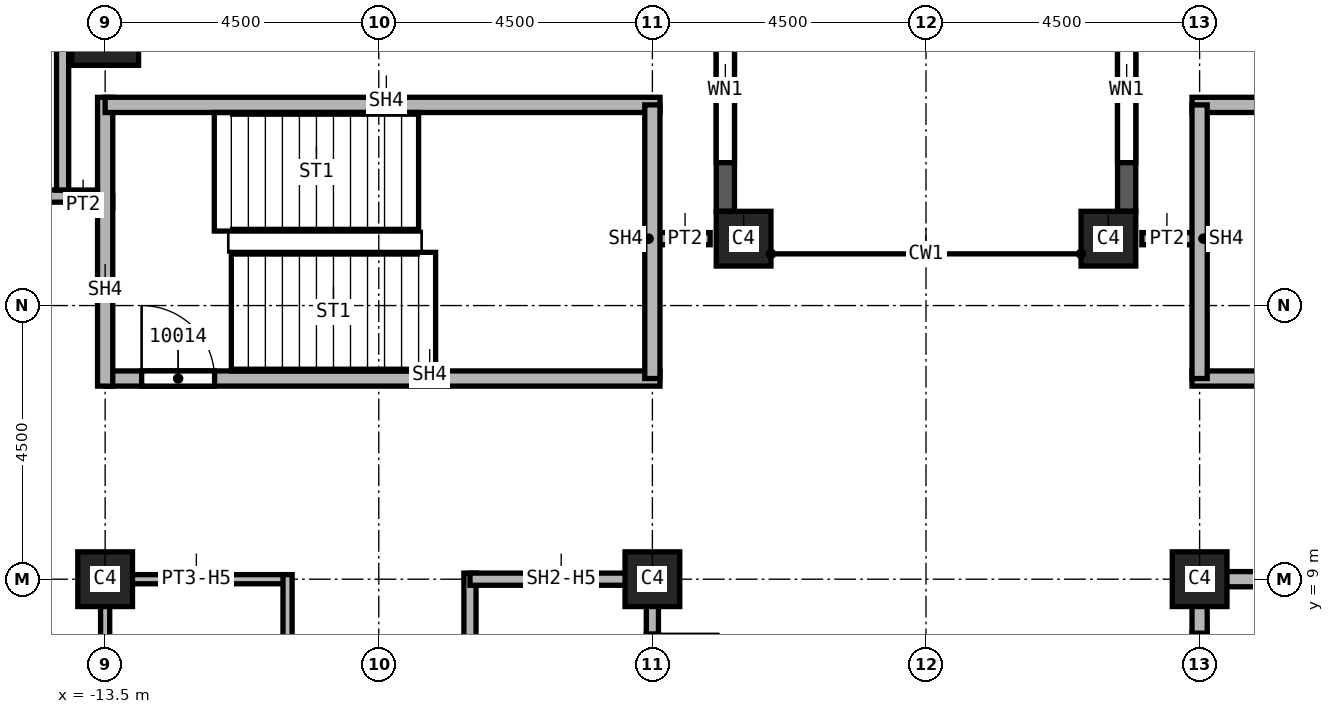
"""IFC4 building model, lengths in metres.
Left out: names, types, materials, properties, quantities, classifications, styles, units other than length and angle.
Written with IfcOpenShell. Run it as: python <this file> out.ifc"""

import sys

from ifc_helpers import new_model, si_unit, direction, frame, frame_2d, origin, origin_2d, place, context, subcontext, project, spatial, rectangle, extrude, element, fill, save


model = new_model("IFC4")
c1 = context("Model", 3, precision=1e-05, world=origin(), true_north=direction((0.0, 1.0)))
c2 = subcontext(c1, "Body", "Model", "MODEL_VIEW")
j1 = project(units=[si_unit("LENGTHUNIT", "METRE"), si_unit("PLANEANGLEUNIT", "RADIAN")], contexts=[c1])
p1 = place(None, origin())
s1 = spatial("IfcSite", under=j1, at=p1, CompositionType="ELEMENT")
p2 = place(p1, origin())
s2 = spatial("IfcBuilding", under=s1, at=p2, CompositionType="ELEMENT")
p3 = place(p2, frame((0.0, 0.0, 174.0)))
s3 = spatial("IfcBuildingStorey", under=s2, at=p3, CompositionType="ELEMENT", Elevation=174.0)
p4 = place(p3, frame((-13.5, 18.0, 0.0), z_axis=(0.0, 0.0, 1.0), x_axis=(1.0, 0.0, 0.0)))
e1 = element("IfcColumn", 1, at=p4, inside=s3, PredefinedType="COLUMN", context=c2, shape_type="SweptSolid", body=[
    extrude(rectangle(XDim=1.1, YDim=1.1, at=origin_2d()), origin(), (0.0, 0.0, 1.0), 3.59),
])
for number, where, z_axis, x_axis in (
    (2, (4.5, 9.0, 0.0), (0.0, 0.0, 1.0), (1.0, 0.0, 0.0)),
    (3, (-4.5, 9.0, 0.0), (0.0, 0.0, 1.0), (1.0, 0.0, 0.0)),
    (4, (-13.5, 9.0, 0.0), (0.0, 0.0, 1.0), (1.0, 0.0, 0.0)),
    (5, (3.0, 14.6, 0.0), (0.0, 0.0, 1.0), (1.0, 0.0, 0.0)),
    (6, (-3.0, 14.6, 0.0), (0.0, 0.0, 1.0), (1.0, 0.0, 0.0)),
):
    element("IfcColumn", number, at=place(p3, frame(where, z_axis=z_axis, x_axis=x_axis)), inside=s3, PredefinedType="COLUMN", context=c2, shape_type="SweptSolid", body=[
        extrude(rectangle(XDim=0.9, YDim=0.9, at=origin_2d()), origin(), (0.0, 0.0, 1.0), 3.59),
    ])
p5 = place(p3, frame((3.3, 23.05, 0.0), z_axis=(0.0, 0.0, 1.0), x_axis=(0.0, -1.0, 0.0)))
e7 = element("IfcWall", 7, at=p5, inside=s3, PredefinedType="SOLIDWALL", context=c2, shape_type="SweptSolid", body=[
    extrude(rectangle(XDim=8.0, YDim=0.3, at=frame_2d((4.0, 0.0))), origin(), (0.0, 0.0, 1.0), 2.99),
])
p6 = place(p5, frame((0.8, 0.0, 0.8)))
e8 = element("IfcOpeningElement", 8, at=p6, cuts=e7, PredefinedType="OPENING", context=c2, shape_type="SweptSolid", body=[
    extrude(rectangle(XDim=2.4, YDim=1.95, at=frame_2d((1.2, 0.975))), frame((0.0, 0.15, 0.0), z_axis=(0.0, -1.0, 0.0), x_axis=(1.0, 0.0, 0.0)), (0.0, 0.0, 1.0), 0.3),
])
p7 = place(p5, frame((4.8, 0.0, 0.8)))
e9 = element("IfcOpeningElement", 9, at=p7, cuts=e7, PredefinedType="OPENING", context=c2, shape_type="SweptSolid", body=[
    extrude(rectangle(XDim=2.4, YDim=1.95, at=frame_2d((1.2, 0.975))), frame((0.0, 0.15, 0.0), z_axis=(0.0, -1.0, 0.0), x_axis=(1.0, 0.0, 0.0)), (0.0, 0.0, 1.0), 0.3),
])
p8 = place(p3, frame((-3.3, 15.05, 0.0), z_axis=(0.0, 0.0, 1.0), x_axis=(0.0, 1.0, 0.0)))
e10 = element("IfcWall", 10, at=p8, inside=s3, PredefinedType="SOLIDWALL", context=c2, shape_type="SweptSolid", body=[
    extrude(rectangle(XDim=8.0, YDim=0.3, at=frame_2d((4.0, 0.0))), origin(), (0.0, 0.0, 1.0), 2.99),
])
p9 = place(p8, frame((0.8, 0.0, 0.8)))
e11 = element("IfcOpeningElement", 11, at=p9, cuts=e10, PredefinedType="OPENING", context=c2, shape_type="SweptSolid", body=[
    extrude(rectangle(XDim=2.4, YDim=1.95, at=frame_2d((1.2, 0.975))), frame((0.0, 0.15, 0.0), z_axis=(0.0, -1.0, 0.0), x_axis=(1.0, 0.0, 0.0)), (0.0, 0.0, 1.0), 0.3),
])
p10 = place(p8, frame((4.8, 0.0, 0.8)))
e12 = element("IfcOpeningElement", 12, at=p10, cuts=e10, PredefinedType="OPENING", context=c2, shape_type="SweptSolid", body=[
    extrude(rectangle(XDim=2.4, YDim=1.95, at=frame_2d((1.2, 0.975))), frame((0.0, 0.15, 0.0), z_axis=(0.0, -1.0, 0.0), x_axis=(1.0, 0.0, 0.0)), (0.0, 0.0, 1.0), 0.3),
])
p11 = place(p3, frame((-14.1, 15.2, 0.0), z_axis=(0.0, 0.0, 1.0), x_axis=(1.0, 0.0, 0.0)))
e13 = element("IfcWall", 13, at=p11, inside=s3, PredefinedType="PARTITIONING", context=c2, shape_type="SweptSolid", body=[
    extrude(rectangle(XDim=0.725, YDim=0.2, at=frame_2d((0.363, 0.0))), origin(), (0.0, 0.0, 1.0), 3.59),
])
for number, where, z_axis, x_axis in (
    (14, (-4.5, 14.6, 0.0), (0.0, 0.0, 1.0), (1.0, 0.0, 0.0)),
    (15, (3.55, 14.6, 0.0), (0.0, 0.0, 1.0), (1.0, 0.0, 0.0)),
):
    element("IfcWall", number, at=place(p3, frame(where, z_axis=z_axis, x_axis=x_axis)), inside=s3, PredefinedType="PARTITIONING", context=c2, shape_type="SweptSolid", body=[
        extrude(rectangle(XDim=0.95, YDim=0.2, at=frame_2d((0.475, 0.0))), origin(), (0.0, 0.0, 1.0), 3.59),
    ])
p12 = place(p3, frame((-7.5, 2.875, 0.0), z_axis=(0.0, 0.0, 1.0), x_axis=(0.0, 1.0, 0.0)))
e16 = element("IfcWall", 16, at=p12, inside=s3, PredefinedType="SOLIDWALL", context=c2, shape_type="SweptSolid", body=[
    extrude(rectangle(XDim=6.225, YDim=0.2, at=frame_2d((3.113, 0.0))), origin(), (0.0, 0.0, 1.0), 3.59),
])
p13 = place(p3, frame((-7.5, 9.0, 0.0), z_axis=(0.0, 0.0, 1.0), x_axis=(1.0, 0.0, 0.0)))
e17 = element("IfcWall", 17, at=p13, inside=s3, PredefinedType="SOLIDWALL", context=c2, shape_type="SweptSolid", body=[
    extrude(rectangle(XDim=3.0, YDim=0.2, at=frame_2d((1.5, 0.0))), origin(), (0.0, 0.0, 1.0), 2.828),
])
p14 = place(p3, frame((-4.5, 9.1, 0.0), z_axis=(0.0, 0.0, 1.0), x_axis=(0.0, -1.0, 0.0)))
e18 = element("IfcWall", 18, at=p14, inside=s3, PredefinedType="SOLIDWALL", context=c2, shape_type="SweptSolid", body=[
    extrude(rectangle(XDim=9.1, YDim=0.2, at=frame_2d((4.55, 0.0))), origin(), (0.0, 0.0, 1.0), 2.828),
])
p15 = place(p14, frame((6.5, 0.0, 0.0)))
e19 = element("IfcOpeningElement", 19, at=p15, cuts=e18, PredefinedType="OPENING", context=c2, shape_type="SweptSolid", body=[
    extrude(rectangle(XDim=1.1, YDim=2.1, at=frame_2d((0.55, 1.05))), frame((0.0, 0.1, 0.0), z_axis=(0.0, -1.0, 0.0), x_axis=(1.0, 0.0, 0.0)), (0.0, 0.0, 1.0), 0.2),
])
p16 = place(p14, frame((1.0, 0.0, 0.0)))
e20 = element("IfcOpeningElement", 20, at=p16, cuts=e18, PredefinedType="OPENING", context=c2, shape_type="SweptSolid", body=[
    extrude(rectangle(XDim=1.1, YDim=2.1, at=frame_2d((0.55, 1.05))), frame((0.0, 0.1, 0.0), z_axis=(0.0, -1.0, 0.0), x_axis=(1.0, 0.0, 0.0)), (0.0, 0.0, 1.0), 0.2),
])
p17 = place(p3, frame((4.5, 0.0, 0.0), z_axis=(0.0, 0.0, 1.0), x_axis=(0.0, 1.0, 0.0)))
e21 = element("IfcWall", 21, at=p17, inside=s3, PredefinedType="SOLIDWALL", context=c2, shape_type="SweptSolid", body=[
    extrude(rectangle(XDim=9.125, YDim=0.25, at=frame_2d((4.562, 0.0))), origin(), (0.0, 0.0, 1.0), 2.828),
])
p18 = place(p17, frame((0.95, 0.0, 0.0)))
e22 = element("IfcOpeningElement", 22, at=p18, cuts=e21, PredefinedType="OPENING", context=c2, shape_type="SweptSolid", body=[
    extrude(rectangle(XDim=1.1, YDim=2.1, at=frame_2d((0.55, 1.05))), frame((0.0, 0.125, 0.0), z_axis=(0.0, -1.0, 0.0), x_axis=(1.0, 0.0, 0.0)), (0.0, 0.0, 1.0), 0.25),
])
p19 = place(p17, frame((3.95, 0.0, 0.0)))
e23 = element("IfcOpeningElement", 23, at=p19, cuts=e21, PredefinedType="OPENING", context=c2, shape_type="SweptSolid", body=[
    extrude(rectangle(XDim=1.1, YDim=2.1, at=frame_2d((0.55, 1.05))), frame((0.0, 0.125, 0.0), z_axis=(0.0, -1.0, 0.0), x_axis=(1.0, 0.0, 0.0)), (0.0, 0.0, 1.0), 0.25),
])
p20 = place(p17, frame((7.012, 0.0, 0.0)))
e24 = element("IfcOpeningElement", 24, at=p20, cuts=e21, PredefinedType="OPENING", context=c2, shape_type="SweptSolid", body=[
    extrude(rectangle(XDim=1.1, YDim=2.1, at=frame_2d((0.55, 1.05))), frame((0.0, 0.125, 0.0), z_axis=(0.0, -1.0, 0.0), x_axis=(1.0, 0.0, 0.0)), (0.0, 0.0, 1.0), 0.25),
])
p21 = place(p3, frame((4.5, 9.0, 0.0), z_axis=(0.0, 0.0, 1.0), x_axis=(1.0, 0.0, 0.0)))
e25 = element("IfcWall", 25, at=p21, inside=s3, PredefinedType="SOLIDWALL", context=c2, shape_type="SweptSolid", body=[
    extrude(rectangle(XDim=3.0, YDim=0.25, at=frame_2d((1.5, 0.0))), origin(), (0.0, 0.0, 1.0), 2.828),
])
p22 = place(p3, frame((-13.5, 12.3, 0.0), z_axis=(0.0, 0.0, 1.0), x_axis=(1.0, 0.0, 0.0)))
e26 = element("IfcWall", 26, at=p22, inside=s3, PredefinedType="SOLIDWALL", context=c2, shape_type="SweptSolid", body=[
    extrude(rectangle(XDim=9.125, YDim=0.25, at=frame_2d((4.562, 0.0))), origin(), (0.0, 0.0, 1.0), 3.59),
])
p23 = place(p22, frame((0.6, 0.0, 0.0)))
e27 = element("IfcOpeningElement", 27, at=p23, cuts=e26, PredefinedType="OPENING", context=c2, shape_type="SweptSolid", body=[
    extrude(rectangle(XDim=1.2, YDim=2.1, at=frame_2d((0.6, 1.05))), frame((0.0, 0.125, 0.0), z_axis=(0.0, -1.0, 0.0), x_axis=(1.0, 0.0, 0.0)), (0.0, 0.0, 1.0), 0.25),
])
p24 = place(p3, frame((-13.5, 12.175, 0.0), z_axis=(0.0, 0.0, 1.0), x_axis=(0.0, 1.0, 0.0)))
e28 = element("IfcWall", 28, at=p24, inside=s3, PredefinedType="SOLIDWALL", context=c2, shape_type="SweptSolid", body=[
    extrude(rectangle(XDim=4.75, YDim=0.25, at=frame_2d((2.375, 0.0))), origin(), (0.0, 0.0, 1.0), 3.59),
])
p25 = place(p3, frame((-13.5, 16.8, 0.0), z_axis=(0.0, 0.0, 1.0), x_axis=(1.0, 0.0, 0.0)))
e29 = element("IfcWall", 29, at=p25, inside=s3, PredefinedType="SOLIDWALL", context=c2, shape_type="SweptSolid", body=[
    extrude(rectangle(XDim=9.125, YDim=0.25, at=frame_2d((4.562, 0.0))), origin(), (0.0, 0.0, 1.0), 3.59),
])
p26 = place(p3, frame((-4.5, 16.8, 0.0), z_axis=(0.0, 0.0, 1.0), x_axis=(0.0, -1.0, 0.0)))
e30 = element("IfcWall", 30, at=p26, inside=s3, PredefinedType="SOLIDWALL", context=c2, shape_type="SweptSolid", body=[
    extrude(rectangle(XDim=4.5, YDim=0.25, at=frame_2d((2.25, 0.0))), origin(), (0.0, 0.0, 1.0), 3.59),
])
p27 = place(p3, frame((4.375, 12.3, 0.0), z_axis=(0.0, 0.0, 1.0), x_axis=(1.0, 0.0, 0.0)))
e31 = element("IfcWall", 31, at=p27, inside=s3, PredefinedType="SOLIDWALL", context=c2, shape_type="SweptSolid", body=[
    extrude(rectangle(XDim=9.125, YDim=0.25, at=frame_2d((4.562, 0.0))), origin(), (0.0, 0.0, 1.0), 3.59),
])
p28 = place(p27, frame((7.2, 0.0, 0.0)))
e32 = element("IfcOpeningElement", 32, at=p28, cuts=e31, PredefinedType="OPENING", context=c2, shape_type="SweptSolid", body=[
    extrude(rectangle(XDim=1.2, YDim=2.1, at=frame_2d((0.6, 1.05))), frame((0.0, 0.125, 0.0), z_axis=(0.0, -1.0, 0.0), x_axis=(1.0, 0.0, 0.0)), (0.0, 0.0, 1.0), 0.25),
])
p29 = place(p3, frame((4.375, 16.8, 0.0), z_axis=(0.0, 0.0, 1.0), x_axis=(1.0, 0.0, 0.0)))
e33 = element("IfcWall", 33, at=p29, inside=s3, PredefinedType="SOLIDWALL", context=c2, shape_type="SweptSolid", body=[
    extrude(rectangle(XDim=9.125, YDim=0.25, at=frame_2d((4.562, 0.0))), origin(), (0.0, 0.0, 1.0), 3.59),
])
p30 = place(p3, frame((4.5, 12.3, 0.0), z_axis=(0.0, 0.0, 1.0), x_axis=(0.0, 1.0, 0.0)))
e34 = element("IfcWall", 34, at=p30, inside=s3, PredefinedType="SOLIDWALL", context=c2, shape_type="SweptSolid", body=[
    extrude(rectangle(XDim=4.5, YDim=0.25, at=frame_2d((2.25, 0.0))), origin(), (0.0, 0.0, 1.0), 3.59),
])
p31 = place(p3, frame((-13.5, 3.0, 0.0), z_axis=(0.0, 0.0, 1.0), x_axis=(0.0, 1.0, 0.0)))
e35 = element("IfcWall", 35, at=p31, inside=s3, PredefinedType="PARTITIONING", context=c2, shape_type="SweptSolid", body=[
    extrude(rectangle(XDim=6.075, YDim=0.15, at=frame_2d((3.038, 0.0))), origin(), (0.0, 0.0, 1.0), 2.828),
])
p32 = place(p3, frame((-13.5, 9.0, 0.0), z_axis=(0.0, 0.0, 1.0), x_axis=(1.0, 0.0, 0.0)))
e36 = element("IfcWall", 36, at=p32, inside=s3, PredefinedType="PARTITIONING", context=c2, shape_type="SweptSolid", body=[
    extrude(rectangle(XDim=3.0, YDim=0.15, at=frame_2d((1.5, 0.0))), origin(), (0.0, 0.0, 1.0), 2.828),
])
p33 = place(p3, frame((-10.5, 2.875, 0.0), z_axis=(0.0, 0.0, 1.0), x_axis=(0.0, 1.0, 0.0)))
e37 = element("IfcWall", 37, at=p33, inside=s3, PredefinedType="PARTITIONING", context=c2, shape_type="SweptSolid", body=[
    extrude(rectangle(XDim=6.2, YDim=0.15, at=frame_2d((3.1, 0.0))), origin(), (0.0, 0.0, 1.0), 3.59),
])
p34 = place(p33, frame((1.75, 0.0, 0.0)))
e38 = element("IfcOpeningElement", 38, at=p34, cuts=e37, PredefinedType="OPENING", context=c2, shape_type="SweptSolid", body=[
    extrude(rectangle(XDim=0.9, YDim=2.1, at=frame_2d((0.45, 1.05))), frame((0.0, 0.075, 0.0), z_axis=(0.0, -1.0, 0.0), x_axis=(1.0, 0.0, 0.0)), (0.0, 0.0, 1.0), 0.15),
])
p35 = place(p3, frame((-21.9, 15.3, 0.0), z_axis=(0.0, 0.0, 1.0), x_axis=(1.0, 0.0, 0.0)))
e39 = element("IfcWall", 39, at=p35, inside=s3, PredefinedType="SOLIDWALL", context=c2, shape_type="SweptSolid", body=[
    extrude(rectangle(XDim=8.275, YDim=0.2, at=frame_2d((4.137, 0.0))), origin(), (0.0, 0.0, 1.0), 3.59),
])
p36 = place(p35, frame((4.8, 0.0, 0.0)))
e40 = element("IfcOpeningElement", 40, at=p36, cuts=e39, PredefinedType="OPENING", context=c2, shape_type="SweptSolid", body=[
    extrude(rectangle(XDim=1.2, YDim=2.1, at=frame_2d((0.6, 1.05))), frame((0.0, 0.1, 0.0), z_axis=(0.0, -1.0, 0.0), x_axis=(1.0, 0.0, 0.0)), (0.0, 0.0, 1.0), 0.2),
])
p37 = place(p3, frame((-14.2, 15.4, 0.0), z_axis=(0.0, 0.0, 1.0), x_axis=(0.0, 1.0, 0.0)))
e41 = element("IfcWall", 41, at=p37, inside=s3, PredefinedType="SOLIDWALL", context=c2, shape_type="SweptSolid", body=[
    extrude(rectangle(XDim=5.9, YDim=0.2, at=frame_2d((2.95, 0.0))), origin(), (0.0, 0.0, 1.0), 3.59),
])
p38 = place(p7, origin())
e42 = element("IfcWindow", 42, at=p38, inside=s3, PartitioningType="SINGLE_PANEL", PredefinedType="WINDOW", context=c2, shape_type="SweptSolid", body=[
    extrude(rectangle(XDim=2.4, YDim=1.95, at=frame_2d((1.2, 0.975))), frame((0.0, 0.03, 0.0), z_axis=(0.0, -1.0, 0.0), x_axis=(1.0, 0.0, 0.0)), (0.0, 0.0, 1.0), 0.06),
])
fill(e9, e42)
p39 = place(p9, origin())
e43 = element("IfcWindow", 43, at=p39, inside=s3, PartitioningType="SINGLE_PANEL", PredefinedType="WINDOW", context=c2, shape_type="SweptSolid", body=[
    extrude(rectangle(XDim=2.4, YDim=1.95, at=frame_2d((1.2, 0.975))), frame((0.0, 0.03, 0.0), z_axis=(0.0, -1.0, 0.0), x_axis=(1.0, 0.0, 0.0)), (0.0, 0.0, 1.0), 0.06),
])
fill(e11, e43)
p40 = place(p23, origin())
e44 = element("IfcDoor", 44, at=p40, inside=s3, OperationType="SINGLE_SWING_LEFT", PredefinedType="DOOR", context=c2, shape_type="SweptSolid", body=[
    extrude(rectangle(XDim=1.2, YDim=2.1, at=frame_2d((0.6, 1.05))), frame((0.0, 0.025, 0.0), z_axis=(0.0, -1.0, 0.0), x_axis=(1.0, 0.0, 0.0)), (0.0, 0.0, 1.0), 0.05),
])
fill(e27, e44)
p41 = place(p20, origin())
e45 = element("IfcDoor", 45, at=p41, inside=s3, OperationType="SLIDING_TO_LEFT", PredefinedType="DOOR", context=c2, shape_type="SweptSolid", body=[
    extrude(rectangle(XDim=1.1, YDim=2.1, at=frame_2d((0.55, 1.05))), frame((0.0, 0.025, 0.0), z_axis=(0.0, -1.0, 0.0), x_axis=(1.0, 0.0, 0.0)), (0.0, 0.0, 1.0), 0.05),
])
fill(e24, e45)
save(model, sys.argv[1])
